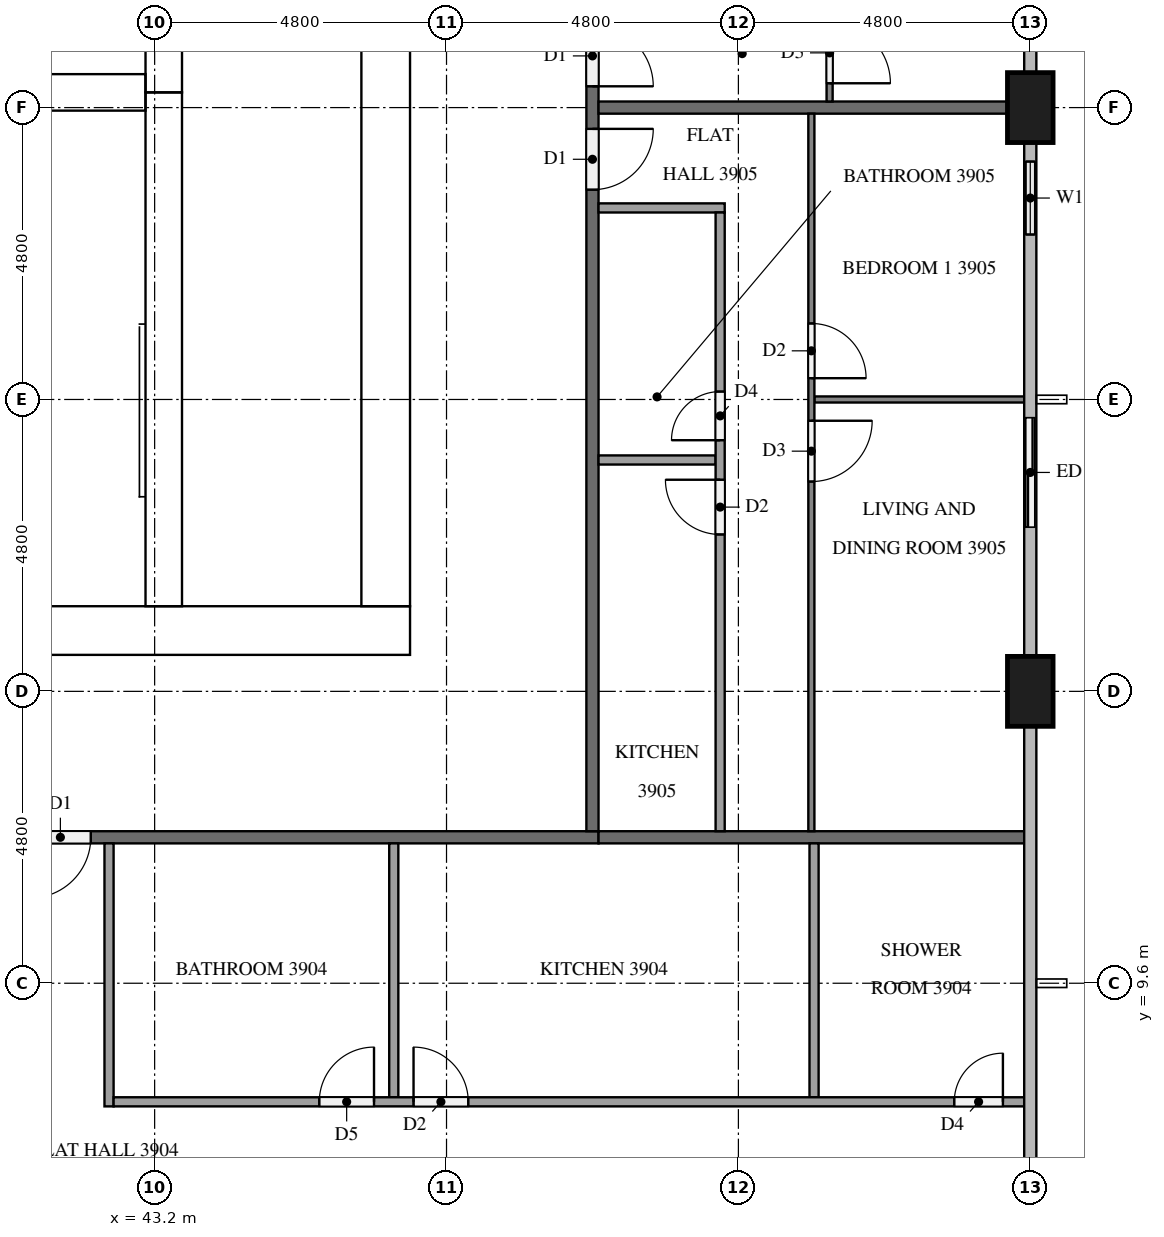
"""IFC4 building model, lengths in metres.
Left out: names, types, materials, properties, quantities, classifications, styles, units other than length and angle.
Written with IfcOpenShell. Run it as: python <this file> out.ifc"""

import sys

from ifc_helpers import new_model, si_unit, direction, frame, frame_2d, origin, origin_2d, place, context, subcontext, project, spatial, rectangle, extrude, element, fill, save


model = new_model("IFC4")
c1 = context("Model", 3, precision=1e-05, world=origin(), true_north=direction((0.0, 1.0)))
c2 = subcontext(c1, "Body", "Model", "MODEL_VIEW")
j1 = project(units=[si_unit("LENGTHUNIT", "METRE"), si_unit("PLANEANGLEUNIT", "RADIAN")], contexts=[c1])
p1 = place(None, origin())
s1 = spatial("IfcSite", under=j1, at=p1, CompositionType="ELEMENT")
p2 = place(p1, origin())
s2 = spatial("IfcBuilding", under=s1, at=p2, CompositionType="ELEMENT")
p3 = place(p2, frame((0.0, 0.0, 152.5)))
s3 = spatial("IfcBuildingStorey", under=s2, at=p3, CompositionType="ELEMENT", Elevation=152.5)
p4 = place(p3, frame((15.0, 15.4, 0.0), z_axis=(0.0, 0.0, 1.0), x_axis=(1.0, 0.0, 0.0)))
e1 = element("IfcWall", 1, at=p4, inside=s3, PredefinedType="SHEAR", context=c2, shape_type="SweptSolid", body=[
    extrude(rectangle(XDim=32.4, YDim=0.8, at=frame_2d((16.2, 0.0))), origin(), (0.0, 0.0, 1.0), 3.2),
])
p5 = place(p4, frame((15.3, 0.0, 0.0)))
e2 = element("IfcOpeningElement", 2, at=p5, cuts=e1, PredefinedType="OPENING", context=c2, shape_type="SweptSolid", body=[
    extrude(rectangle(XDim=1.8, YDim=2.1, at=frame_2d((0.9, 1.05))), frame((0.0, 0.41, 0.0), z_axis=(0.0, -1.0, 0.0), x_axis=(1.0, 0.0, 0.0)), (0.0, 0.0, 1.0), 0.82),
])
p6 = place(p3, frame((47.0, 15.8, 0.0), z_axis=(0.0, 0.0, 1.0), x_axis=(0.0, 1.0, 0.0)))
e3 = element("IfcWall", 3, at=p6, inside=s3, PredefinedType="SHEAR", context=c2, shape_type="SweptSolid", body=[
    extrude(rectangle(XDim=21.2, YDim=0.8, at=frame_2d((10.6, 0.0))), origin(), (0.0, 0.0, 1.0), 3.2),
])
p7 = place(p6, frame((10.3, 0.0, 0.0)))
e4 = element("IfcOpeningElement", 4, at=p7, cuts=e3, PredefinedType="OPENING", context=c2, shape_type="SweptSolid", body=[
    extrude(rectangle(XDim=1.2, YDim=2.1, at=frame_2d((0.6, 1.05))), frame((0.0, 0.41, 0.0), z_axis=(0.0, -1.0, 0.0), x_axis=(1.0, 0.0, 0.0)), (0.0, 0.0, 1.0), 0.82),
])
p8 = place(p3, frame((43.35, 15.8, 0.0), z_axis=(0.0, 0.0, 1.0), x_axis=(0.0, 1.0, 0.0)))
e5 = element("IfcWall", 5, at=p8, inside=s3, PredefinedType="SHEAR", context=c2, shape_type="SweptSolid", body=[
    extrude(rectangle(XDim=8.45, YDim=0.6, at=frame_2d((4.225, 0.0))), origin(), (0.0, 0.0, 1.0), 3.2),
])
p9 = place(p8, frame((0.4, 0.0, 0.0)))
e6 = element("IfcOpeningElement", 6, at=p9, cuts=e5, PredefinedType="OPENING", context=c2, shape_type="SweptSolid", body=[
    extrude(rectangle(XDim=1.2, YDim=2.1, at=frame_2d((0.6, 1.05))), frame((0.0, 0.31, 0.0), z_axis=(0.0, -1.0, 0.0), x_axis=(1.0, 0.0, 0.0)), (0.0, 0.0, 1.0), 0.62),
])
p10 = place(p3, frame((43.35, 24.25, 0.0), z_axis=(0.0, 0.0, 1.0), x_axis=(0.0, 1.0, 0.0)))
e7 = element("IfcWall", 7, at=p10, inside=s3, PredefinedType="SHEAR", context=c2, shape_type="SweptSolid", body=[
    extrude(rectangle(XDim=3.5, YDim=0.6, at=frame_2d((1.75, 0.0))), origin(), (0.0, 0.0, 1.0), 3.2),
])
p11 = place(p10, frame((1.2, 0.0, 0.0)))
e8 = element("IfcOpeningElement", 8, at=p11, cuts=e7, PredefinedType="OPENING", context=c2, shape_type="SweptSolid", body=[
    extrude(rectangle(XDim=1.1, YDim=2.1, at=frame_2d((0.55, 1.05))), frame((0.0, 0.31, 0.0), z_axis=(0.0, -1.0, 0.0), x_axis=(1.0, 0.0, 0.0)), (0.0, 0.0, 1.0), 0.62),
])
p12 = place(p3, frame((39.6, 24.25, 0.0), z_axis=(0.0, 0.0, 1.0), x_axis=(1.0, 0.0, 0.0)))
e9 = element("IfcWall", 9, at=p12, inside=s3, PredefinedType="SHEAR", context=c2, shape_type="SweptSolid", body=[
    extrude(rectangle(XDim=3.45, YDim=0.6, at=frame_2d((1.725, 0.0))), origin(), (0.0, 0.0, 1.0), 3.2),
])
for number, where, z_axis, x_axis in (
    (10, (57.6, 14.4, 0.0), (0.0, 0.0, 1.0), (0.0, 1.0, 0.0)),
    (11, (57.6, 24.0, 0.0), (0.0, 0.0, 1.0), (0.0, 1.0, 0.0)),
):
    element("IfcColumn", number, at=place(p3, frame(where, z_axis=z_axis, x_axis=x_axis)), inside=s3, PredefinedType="COLUMN", context=c2, shape_type="SweptSolid", body=[
        extrude(rectangle(XDim=1.15, YDim=0.75, at=origin_2d()), origin(), (0.0, 0.0, 1.0), 3.2),
    ])
p13 = place(p3, frame((57.6, 16.8, 0.0), z_axis=(0.0, 0.0, 1.0), x_axis=(0.0, 1.0, 0.0)))
e12 = element("IfcWall", 12, at=p13, inside=s3, PredefinedType="SOLIDWALL", context=c2, shape_type="SweptSolid", body=[
    extrude(rectangle(XDim=2.4, YDim=0.15, at=frame_2d((1.2, 0.0))), origin(), (0.0, 0.0, 1.0), 3.2),
])
p14 = place(p13, frame((0.3, 0.0, 0.0)))
e13 = element("IfcOpeningElement", 13, at=p14, cuts=e12, PredefinedType="OPENING", context=c2, shape_type="SweptSolid", body=[
    extrude(rectangle(XDim=1.8, YDim=2.4, at=frame_2d((0.9, 1.2))), frame((0.0, 0.085, 0.0), z_axis=(0.0, -1.0, 0.0), x_axis=(1.0, 0.0, 0.0)), (0.0, 0.0, 1.0), 0.17),
])
p15 = place(p3, frame((57.6, 21.6, 0.0), z_axis=(0.0, 0.0, 1.0), x_axis=(0.0, 1.0, 0.0)))
e14 = element("IfcWall", 14, at=p15, inside=s3, PredefinedType="SOLIDWALL", context=c2, shape_type="SweptSolid", body=[
    extrude(rectangle(XDim=1.825, YDim=0.15, at=frame_2d((0.913, 0.0))), origin(), (0.0, 0.0, 1.0), 3.2),
])
p16 = place(p15, frame((0.312, 0.0, 0.9)))
e15 = element("IfcOpeningElement", 15, at=p16, cuts=e14, PredefinedType="OPENING", context=c2, shape_type="SweptSolid", body=[
    extrude(rectangle(XDim=1.2, YDim=1.4, at=frame_2d((0.6, 0.7))), frame((0.0, 0.085, 0.0), z_axis=(0.0, -1.0, 0.0), x_axis=(1.0, 0.0, 0.0)), (0.0, 0.0, 1.0), 0.17),
])
p17 = place(p3, frame((50.5, 12.0, 0.0), z_axis=(0.0, 0.0, 1.0), x_axis=(-1.0, 0.0, 0.0)))
e16 = element("IfcWall", 16, at=p17, inside=s3, PredefinedType="PARTITIONING", context=c2, shape_type="SweptSolid", body=[
    extrude(rectangle(XDim=38.6, YDim=0.2, at=frame_2d((19.3, 0.0))), origin(), (0.0, 0.0, 1.0), 3.2),
])
p18 = place(p17, frame((36.45, 0.0, 0.0)))
e17 = element("IfcOpeningElement", 17, at=p18, cuts=e16, PredefinedType="OPENING", context=c2, shape_type="SweptSolid", body=[
    extrude(rectangle(XDim=1.0, YDim=2.1, at=frame_2d((0.5, 1.05))), frame((0.0, 0.11, 0.0), z_axis=(0.0, -1.0, 0.0), x_axis=(1.0, 0.0, 0.0)), (0.0, 0.0, 1.0), 0.22),
])
p19 = place(p17, frame((34.75, 0.0, 0.0)))
e18 = element("IfcOpeningElement", 18, at=p19, cuts=e16, PredefinedType="OPENING", context=c2, shape_type="SweptSolid", body=[
    extrude(rectangle(XDim=1.0, YDim=2.1, at=frame_2d((0.5, 1.05))), frame((0.0, 0.11, 0.0), z_axis=(0.0, -1.0, 0.0), x_axis=(1.0, 0.0, 0.0)), (0.0, 0.0, 1.0), 0.22),
])
p20 = place(p17, frame((10.05, 0.0, 0.0)))
e19 = element("IfcOpeningElement", 19, at=p20, cuts=e16, PredefinedType="OPENING", context=c2, shape_type="SweptSolid", body=[
    extrude(rectangle(XDim=1.0, YDim=2.1, at=frame_2d((0.5, 1.05))), frame((0.0, 0.11, 0.0), z_axis=(0.0, -1.0, 0.0), x_axis=(1.0, 0.0, 0.0)), (0.0, 0.0, 1.0), 0.22),
])
p21 = place(p17, frame((8.35, 0.0, 0.0)))
e20 = element("IfcOpeningElement", 20, at=p21, cuts=e16, PredefinedType="OPENING", context=c2, shape_type="SweptSolid", body=[
    extrude(rectangle(XDim=1.0, YDim=2.1, at=frame_2d((0.5, 1.05))), frame((0.0, 0.11, 0.0), z_axis=(0.0, -1.0, 0.0), x_axis=(1.0, 0.0, 0.0)), (0.0, 0.0, 1.0), 0.22),
])
p22 = place(p3, frame((50.4, 40.7, 0.0), z_axis=(0.0, 0.0, 1.0), x_axis=(0.0, -1.0, 0.0)))
e21 = element("IfcWall", 21, at=p22, inside=s3, PredefinedType="PARTITIONING", context=c2, shape_type="SweptSolid", body=[
    extrude(rectangle(XDim=28.6, YDim=0.2, at=frame_2d((14.3, 0.0))), origin(), (0.0, 0.0, 1.0), 3.2),
])
p23 = place(p22, frame((17.05, 0.0, 0.0)))
e22 = element("IfcOpeningElement", 22, at=p23, cuts=e21, PredefinedType="OPENING", context=c2, shape_type="SweptSolid", body=[
    extrude(rectangle(XDim=1.0, YDim=2.1, at=frame_2d((0.5, 1.05))), frame((0.0, 0.11, 0.0), z_axis=(0.0, -1.0, 0.0), x_axis=(1.0, 0.0, 0.0)), (0.0, 0.0, 1.0), 0.22),
])
p24 = place(p22, frame((15.35, 0.0, 0.0)))
e23 = element("IfcOpeningElement", 23, at=p24, cuts=e21, PredefinedType="OPENING", context=c2, shape_type="SweptSolid", body=[
    extrude(rectangle(XDim=1.0, YDim=2.1, at=frame_2d((0.5, 1.05))), frame((0.0, 0.11, 0.0), z_axis=(0.0, -1.0, 0.0), x_axis=(1.0, 0.0, 0.0)), (0.0, 0.0, 1.0), 0.22),
])
p25 = place(p22, frame((5.75, 0.0, 0.0)))
e24 = element("IfcOpeningElement", 24, at=p25, cuts=e21, PredefinedType="OPENING", context=c2, shape_type="SweptSolid", body=[
    extrude(rectangle(XDim=1.0, YDim=2.1, at=frame_2d((0.5, 1.05))), frame((0.0, 0.11, 0.0), z_axis=(0.0, -1.0, 0.0), x_axis=(1.0, 0.0, 0.0)), (0.0, 0.0, 1.0), 0.22),
])
p26 = place(p3, frame((50.5, 12.0, 0.0), z_axis=(0.0, 0.0, 1.0), x_axis=(1.0, 0.0, 0.0)))
e25 = element("IfcWall", 25, at=p26, inside=s3, PredefinedType="PARTITIONING", context=c2, shape_type="SweptSolid", body=[
    extrude(rectangle(XDim=7.0, YDim=0.2, at=frame_2d((3.5, 0.0))), origin(), (0.0, 0.0, 1.0), 3.2),
])
p27 = place(p3, frame((50.5, 24.0, 0.0), z_axis=(0.0, 0.0, 1.0), x_axis=(1.0, 0.0, 0.0)))
e26 = element("IfcWall", 26, at=p27, inside=s3, PredefinedType="PARTITIONING", context=c2, shape_type="SweptSolid", body=[
    extrude(rectangle(XDim=6.725, YDim=0.2, at=frame_2d((3.363, 0.0))), origin(), (0.0, 0.0, 1.0), 3.2),
])
for number, where, z_axis, x_axis in (
    (27, (47.133, 11.9, 0.0), (0.0, 0.0, 1.0), (0.0, -1.0, 0.0)),
    (28, (54.044, 11.9, 0.0), (0.0, 0.0, 1.0), (0.0, -1.0, 0.0)),
):
    element("IfcWall", number, at=place(p3, frame(where, z_axis=z_axis, x_axis=x_axis)), inside=s3, PredefinedType="PARTITIONING", context=c2, shape_type="SweptSolid", body=[
        extrude(rectangle(XDim=4.175, YDim=0.15, at=frame_2d((2.087, 0.0))), origin(), (0.0, 0.0, 1.0), 3.2),
    ])
p28 = place(p3, frame((42.45, 11.9, 0.0), z_axis=(0.0, 0.0, 1.0), x_axis=(0.0, -1.0, 0.0)))
e29 = element("IfcWall", 29, at=p28, inside=s3, PredefinedType="PARTITIONING", context=c2, shape_type="SweptSolid", body=[
    extrude(rectangle(XDim=4.325, YDim=0.15, at=frame_2d((2.163, 0.0))), origin(), (0.0, 0.0, 1.0), 3.2),
])
p29 = place(p3, frame((42.525, 7.65, 0.0), z_axis=(0.0, 0.0, 1.0), x_axis=(1.0, 0.0, 0.0)))
e30 = element("IfcWall", 30, at=p29, inside=s3, PredefinedType="PARTITIONING", context=c2, shape_type="SweptSolid", body=[
    extrude(rectangle(XDim=14.975, YDim=0.15, at=frame_2d((7.488, 0.0))), origin(), (0.0, 0.0, 1.0), 3.2),
])
p30 = place(p29, frame((3.383, 0.0, 0.0)))
e31 = element("IfcOpeningElement", 31, at=p30, cuts=e30, PredefinedType="OPENING", context=c2, shape_type="SweptSolid", body=[
    extrude(rectangle(XDim=0.9, YDim=2.1, at=frame_2d((0.45, 1.05))), frame((0.0, 0.085, 0.0), z_axis=(0.0, -1.0, 0.0), x_axis=(1.0, 0.0, 0.0)), (0.0, 0.0, 1.0), 0.17),
])
p31 = place(p29, frame((4.933, 0.0, 0.0)))
e32 = element("IfcOpeningElement", 32, at=p31, cuts=e30, PredefinedType="OPENING", context=c2, shape_type="SweptSolid", body=[
    extrude(rectangle(XDim=0.9, YDim=2.1, at=frame_2d((0.45, 1.05))), frame((0.0, 0.085, 0.0), z_axis=(0.0, -1.0, 0.0), x_axis=(1.0, 0.0, 0.0)), (0.0, 0.0, 1.0), 0.17),
])
p32 = place(p29, frame((13.825, 0.0, 0.0)))
e33 = element("IfcOpeningElement", 33, at=p32, cuts=e30, PredefinedType="OPENING", context=c2, shape_type="SweptSolid", body=[
    extrude(rectangle(XDim=0.8, YDim=2.1, at=frame_2d((0.4, 1.05))), frame((0.0, 0.085, 0.0), z_axis=(0.0, -1.0, 0.0), x_axis=(1.0, 0.0, 0.0)), (0.0, 0.0, 1.0), 0.17),
])
p33 = place(p3, frame((54.05, 19.2, 0.0), z_axis=(0.0, 0.0, 1.0), x_axis=(1.0, 0.0, 0.0)))
e34 = element("IfcWall", 34, at=p33, inside=s3, PredefinedType="PARTITIONING", context=c2, shape_type="SweptSolid", body=[
    extrude(rectangle(XDim=3.45, YDim=0.1, at=frame_2d((1.725, 0.0))), origin(), (0.0, 0.0, 1.0), 3.2),
])
p34 = place(p3, frame((54.0, 23.9, 0.0), z_axis=(0.0, 0.0, 1.0), x_axis=(0.0, -1.0, 0.0)))
e35 = element("IfcWall", 35, at=p34, inside=s3, PredefinedType="PARTITIONING", context=c2, shape_type="SweptSolid", body=[
    extrude(rectangle(XDim=11.8, YDim=0.1, at=frame_2d((5.9, 0.0))), origin(), (0.0, 0.0, 1.0), 3.2),
])
p35 = place(p34, frame((3.45, 0.0, 0.0)))
e36 = element("IfcOpeningElement", 36, at=p35, cuts=e35, PredefinedType="OPENING", context=c2, shape_type="SweptSolid", body=[
    extrude(rectangle(XDim=0.9, YDim=2.1, at=frame_2d((0.45, 1.05))), frame((0.0, 0.06, 0.0), z_axis=(0.0, -1.0, 0.0), x_axis=(1.0, 0.0, 0.0)), (0.0, 0.0, 1.0), 0.12),
])
p36 = place(p34, frame((5.05, 0.0, 0.0)))
e37 = element("IfcOpeningElement", 37, at=p36, cuts=e35, PredefinedType="OPENING", context=c2, shape_type="SweptSolid", body=[
    extrude(rectangle(XDim=1.0, YDim=2.1, at=frame_2d((0.5, 1.05))), frame((0.0, 0.06, 0.0), z_axis=(0.0, -1.0, 0.0), x_axis=(1.0, 0.0, 0.0)), (0.0, 0.0, 1.0), 0.12),
])
p37 = place(p3, frame((50.5, 18.205, 0.0), z_axis=(0.0, 0.0, 1.0), x_axis=(1.0, 0.0, 0.0)))
e38 = element("IfcWall", 38, at=p37, inside=s3, PredefinedType="PARTITIONING", context=c2, shape_type="SweptSolid", body=[
    extrude(rectangle(XDim=1.925, YDim=0.15, at=frame_2d((0.962, 0.0))), origin(), (0.0, 0.0, 1.0), 3.2),
])
p38 = place(p3, frame((50.5, 22.35, 0.0), z_axis=(0.0, 0.0, 1.0), x_axis=(1.0, 0.0, 0.0)))
e39 = element("IfcWall", 39, at=p38, inside=s3, PredefinedType="PARTITIONING", context=c2, shape_type="SweptSolid", body=[
    extrude(rectangle(XDim=2.075, YDim=0.15, at=frame_2d((1.038, 0.0))), origin(), (0.0, 0.0, 1.0), 3.2),
])
p39 = place(p3, frame((52.5, 12.1, 0.0), z_axis=(0.0, 0.0, 1.0), x_axis=(0.0, 1.0, 0.0)))
e40 = element("IfcWall", 40, at=p39, inside=s3, PredefinedType="PARTITIONING", context=c2, shape_type="SweptSolid", body=[
    extrude(rectangle(XDim=10.175, YDim=0.15, at=frame_2d((5.087, 0.0))), origin(), (0.0, 0.0, 1.0), 3.2),
])
p40 = place(p39, frame((6.43, 0.0, 0.0)))
e41 = element("IfcOpeningElement", 41, at=p40, cuts=e40, PredefinedType="OPENING", context=c2, shape_type="SweptSolid", body=[
    extrude(rectangle(XDim=0.8, YDim=2.1, at=frame_2d((0.4, 1.05))), frame((0.0, 0.085, 0.0), z_axis=(0.0, -1.0, 0.0), x_axis=(1.0, 0.0, 0.0)), (0.0, 0.0, 1.0), 0.17),
])
p41 = place(p39, frame((4.88, 0.0, 0.0)))
e42 = element("IfcOpeningElement", 42, at=p41, cuts=e40, PredefinedType="OPENING", context=c2, shape_type="SweptSolid", body=[
    extrude(rectangle(XDim=0.9, YDim=2.1, at=frame_2d((0.45, 1.05))), frame((0.0, 0.085, 0.0), z_axis=(0.0, -1.0, 0.0), x_axis=(1.0, 0.0, 0.0)), (0.0, 0.0, 1.0), 0.17),
])
p42 = place(p3, frame((54.3, 33.5, 0.0), z_axis=(0.0, 0.0, 1.0), x_axis=(0.0, -1.0, 0.0)))
e43 = element("IfcWall", 43, at=p42, inside=s3, PredefinedType="PARTITIONING", context=c2, shape_type="SweptSolid", body=[
    extrude(rectangle(XDim=9.4, YDim=0.1, at=frame_2d((4.7, 0.0))), origin(), (0.0, 0.0, 1.0), 3.2),
])
p43 = place(p42, frame((8.1, 0.0, 0.0)))
e44 = element("IfcOpeningElement", 44, at=p43, cuts=e43, PredefinedType="OPENING", context=c2, shape_type="SweptSolid", body=[
    extrude(rectangle(XDim=1.0, YDim=2.1, at=frame_2d((0.5, 1.05))), frame((0.0, 0.06, 0.0), z_axis=(0.0, -1.0, 0.0), x_axis=(1.0, 0.0, 0.0)), (0.0, 0.0, 1.0), 0.12),
])
p44 = place(p42, frame((0.3, 0.0, 0.0)))
e45 = element("IfcOpeningElement", 45, at=p44, cuts=e43, PredefinedType="OPENING", context=c2, shape_type="SweptSolid", body=[
    extrude(rectangle(XDim=0.9, YDim=2.1, at=frame_2d((0.45, 1.05))), frame((0.0, 0.06, 0.0), z_axis=(0.0, -1.0, 0.0), x_axis=(1.0, 0.0, 0.0)), (0.0, 0.0, 1.0), 0.12),
])
p45 = place(p14, origin())
e46 = element("IfcDoor", 46, at=p45, inside=s3, OperationType="SLIDING_TO_LEFT", PredefinedType="DOOR", context=c2, shape_type="SweptSolid", body=[
    extrude(rectangle(XDim=1.8, YDim=2.4, at=frame_2d((0.9, 1.2))), frame((0.0, 0.025, 0.0), z_axis=(0.0, -1.0, 0.0), x_axis=(1.0, 0.0, 0.0)), (0.0, 0.0, 1.0), 0.05),
])
fill(e13, e46)
p46 = place(p16, origin())
e47 = element("IfcWindow", 47, at=p46, inside=s3, PartitioningType="SINGLE_PANEL", PredefinedType="WINDOW", context=c2, shape_type="SweptSolid", body=[
    extrude(rectangle(XDim=1.2, YDim=1.4, at=frame_2d((0.6, 0.7))), frame((0.0, 0.03, 0.0), z_axis=(0.0, -1.0, 0.0), x_axis=(1.0, 0.0, 0.0)), (0.0, 0.0, 1.0), 0.06),
])
fill(e15, e47)
p47 = place(p9, origin())
e48 = element("IfcDoor", 48, at=p47, inside=s3, OperationType="SINGLE_SWING_RIGHT", PredefinedType="DOOR", context=c2, shape_type="SweptSolid", body=[
    extrude(rectangle(XDim=1.2, YDim=2.1, at=frame_2d((0.6, 1.05))), frame((0.0, 0.025, 0.0), z_axis=(0.0, -1.0, 0.0), x_axis=(1.0, 0.0, 0.0)), (0.0, 0.0, 1.0), 0.05),
])
fill(e6, e48)
p48 = place(p21, origin())
e49 = element("IfcDoor", 49, at=p48, inside=s3, OperationType="SINGLE_SWING_RIGHT", PredefinedType="DOOR", context=c2, shape_type="SweptSolid", body=[
    extrude(rectangle(XDim=1.0, YDim=2.1, at=frame_2d((0.5, 1.05))), frame((0.0, 0.025, 0.0), z_axis=(0.0, -1.0, 0.0), x_axis=(1.0, 0.0, 0.0)), (0.0, 0.0, 1.0), 0.05),
])
fill(e20, e49)
p49 = place(p23, origin())
e50 = element("IfcDoor", 50, at=p49, inside=s3, OperationType="SINGLE_SWING_LEFT", PredefinedType="DOOR", context=c2, shape_type="SweptSolid", body=[
    extrude(rectangle(XDim=1.0, YDim=2.1, at=frame_2d((0.5, 1.05))), frame((0.0, 0.025, 0.0), z_axis=(0.0, -1.0, 0.0), x_axis=(1.0, 0.0, 0.0)), (0.0, 0.0, 1.0), 0.05),
])
fill(e22, e50)
p50 = place(p24, origin())
e51 = element("IfcDoor", 51, at=p50, inside=s3, OperationType="SINGLE_SWING_RIGHT", PredefinedType="DOOR", context=c2, shape_type="SweptSolid", body=[
    extrude(rectangle(XDim=1.0, YDim=2.1, at=frame_2d((0.5, 1.05))), frame((0.0, 0.025, 0.0), z_axis=(0.0, -1.0, 0.0), x_axis=(1.0, 0.0, 0.0)), (0.0, 0.0, 1.0), 0.05),
])
fill(e23, e51)
p51 = place(p30, origin())
e52 = element("IfcDoor", 52, at=p51, inside=s3, OperationType="SINGLE_SWING_RIGHT", PredefinedType="DOOR", context=c2, shape_type="SweptSolid", body=[
    extrude(rectangle(XDim=0.9, YDim=2.1, at=frame_2d((0.45, 1.05))), frame((0.0, 0.025, 0.0), z_axis=(0.0, -1.0, 0.0), x_axis=(1.0, 0.0, 0.0)), (0.0, 0.0, 1.0), 0.05),
])
fill(e31, e52)
p52 = place(p31, origin())
e53 = element("IfcDoor", 53, at=p52, inside=s3, OperationType="SINGLE_SWING_LEFT", PredefinedType="DOOR", context=c2, shape_type="SweptSolid", body=[
    extrude(rectangle(XDim=0.9, YDim=2.1, at=frame_2d((0.45, 1.05))), frame((0.0, 0.025, 0.0), z_axis=(0.0, -1.0, 0.0), x_axis=(1.0, 0.0, 0.0)), (0.0, 0.0, 1.0), 0.05),
])
fill(e32, e53)
p53 = place(p32, origin())
e54 = element("IfcDoor", 54, at=p53, inside=s3, OperationType="SINGLE_SWING_RIGHT", PredefinedType="DOOR", context=c2, shape_type="SweptSolid", body=[
    extrude(rectangle(XDim=0.8, YDim=2.1, at=frame_2d((0.4, 1.05))), frame((0.0, 0.025, 0.0), z_axis=(0.0, -1.0, 0.0), x_axis=(1.0, 0.0, 0.0)), (0.0, 0.0, 1.0), 0.05),
])
fill(e33, e54)
p54 = place(p35, origin())
e55 = element("IfcDoor", 55, at=p54, inside=s3, OperationType="SINGLE_SWING_RIGHT", PredefinedType="DOOR", context=c2, shape_type="SweptSolid", body=[
    extrude(rectangle(XDim=0.9, YDim=2.1, at=frame_2d((0.45, 1.05))), frame((0.0, 0.025, 0.0), z_axis=(0.0, -1.0, 0.0), x_axis=(1.0, 0.0, 0.0)), (0.0, 0.0, 1.0), 0.05),
])
fill(e36, e55)
p55 = place(p36, origin())
e56 = element("IfcDoor", 56, at=p55, inside=s3, OperationType="SINGLE_SWING_LEFT", PredefinedType="DOOR", context=c2, shape_type="SweptSolid", body=[
    extrude(rectangle(XDim=1.0, YDim=2.1, at=frame_2d((0.5, 1.05))), frame((0.0, 0.025, 0.0), z_axis=(0.0, -1.0, 0.0), x_axis=(1.0, 0.0, 0.0)), (0.0, 0.0, 1.0), 0.05),
])
fill(e37, e56)
p56 = place(p40, origin())
e57 = element("IfcDoor", 57, at=p56, inside=s3, OperationType="SINGLE_SWING_LEFT", PredefinedType="DOOR", context=c2, shape_type="SweptSolid", body=[
    extrude(rectangle(XDim=0.8, YDim=2.1, at=frame_2d((0.4, 1.05))), frame((0.0, 0.025, 0.0), z_axis=(0.0, -1.0, 0.0), x_axis=(1.0, 0.0, 0.0)), (0.0, 0.0, 1.0), 0.05),
])
fill(e41, e57)
p57 = place(p41, origin())
e58 = element("IfcDoor", 58, at=p57, inside=s3, OperationType="SINGLE_SWING_RIGHT", PredefinedType="DOOR", context=c2, shape_type="SweptSolid", body=[
    extrude(rectangle(XDim=0.9, YDim=2.1, at=frame_2d((0.45, 1.05))), frame((0.0, 0.025, 0.0), z_axis=(0.0, -1.0, 0.0), x_axis=(1.0, 0.0, 0.0)), (0.0, 0.0, 1.0), 0.05),
])
fill(e42, e58)
p58 = place(p43, origin())
e59 = element("IfcDoor", 59, at=p58, inside=s3, OperationType="SINGLE_SWING_RIGHT", PredefinedType="DOOR", context=c2, shape_type="SweptSolid", body=[
    extrude(rectangle(XDim=1.0, YDim=2.1, at=frame_2d((0.5, 1.05))), frame((0.0, 0.025, 0.0), z_axis=(0.0, -1.0, 0.0), x_axis=(1.0, 0.0, 0.0)), (0.0, 0.0, 1.0), 0.05),
])
fill(e44, e59)
save(model, sys.argv[1])
